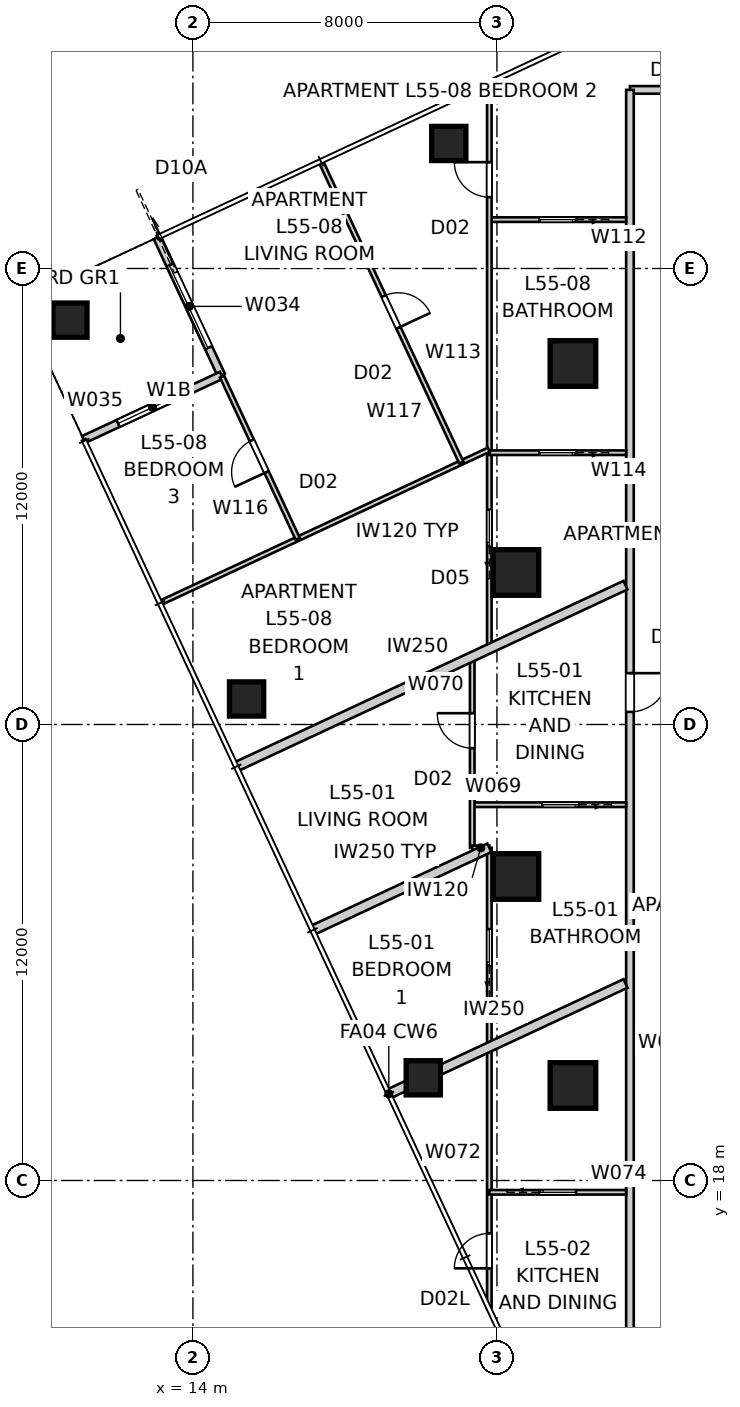
"""IFC4 building model, lengths in metres.
Left out: names, types, materials, properties, quantities, classifications, styles, units other than length and angle.
Written with IfcOpenShell. Run it as: python <this file> out.ifc"""

import sys

from ifc_helpers import new_model, si_unit, direction, frame, frame_2d, origin, origin_2d, place, context, subcontext, project, spatial, rectangle, extrude, element, fill, save


model = new_model("IFC4")
c1 = context("Model", 3, precision=1e-05, world=origin(), true_north=direction((0.0, 1.0)))
c2 = subcontext(c1, "Body", "Model", "MODEL_VIEW")
j1 = project(units=[si_unit("LENGTHUNIT", "METRE"), si_unit("PLANEANGLEUNIT", "RADIAN")], contexts=[c1])
p1 = place(None, origin())
s1 = spatial("IfcSite", under=j1, at=p1, CompositionType="ELEMENT")
p2 = place(p1, origin())
s2 = spatial("IfcBuilding", under=s1, at=p2, CompositionType="ELEMENT")
p3 = place(p2, frame((0.0, 0.0, 199.8)))
s3 = spatial("IfcBuildingStorey", under=s2, at=p3, CompositionType="ELEMENT", Elevation=199.8)
for number, where, z_axis, x_axis in (
    (1, (20.733, 45.29, 0.0), (0.0, 0.0, 1.0), (1.0, 0.0, 0.0)),
    (2, (10.764, 40.641, 0.0), (0.0, 0.0, 1.0), (1.0, 0.0, 0.0)),
    (3, (15.412, 30.672, 0.0), (0.0, 0.0, 1.0), (1.0, 0.0, 0.0)),
    (4, (20.061, 20.702, 0.0), (0.0, 0.0, 1.0), (1.0, 0.0, 0.0)),
):
    element("IfcColumn", number, at=place(p3, frame(where, z_axis=z_axis, x_axis=x_axis)), inside=s3, PredefinedType="COLUMN", context=c2, shape_type="SweptSolid", body=[
        extrude(rectangle(XDim=0.9, YDim=0.9, at=origin_2d()), origin(), (0.0, 0.0, 1.0), 3.2),
    ])
for number, where, z_axis, x_axis in (
    (5, (24.0, 39.5, 0.0), (0.0, 0.0, 1.0), (1.0, 0.0, 0.0)),
    (6, (22.5, 34.0, 0.0), (0.0, 0.0, 1.0), (1.0, 0.0, 0.0)),
    (7, (22.5, 26.0, 0.0), (0.0, 0.0, 1.0), (1.0, 0.0, 0.0)),
    (8, (24.0, 20.5, 0.0), (0.0, 0.0, 1.0), (1.0, 0.0, 0.0)),
):
    element("IfcColumn", number, at=place(p3, frame(where, z_axis=z_axis, x_axis=x_axis)), inside=s3, PredefinedType="COLUMN", context=c2, shape_type="SweptSolid", body=[
        extrude(rectangle(XDim=1.2, YDim=1.2, at=origin_2d()), origin(), (0.0, 0.0, 1.0), 3.4),
    ])
p4 = place(p3, frame((13.06, 42.815, 0.0), z_axis=(0.0, 0.0, 1.0), x_axis=(0.422658246362, -0.906289140828, 0.0)))
e9 = element("IfcWall", 9, at=p4, inside=s3, PredefinedType="SOLIDWALL", context=c2, shape_type="SweptSolid", body=[
    extrude(rectangle(XDim=4.0, YDim=0.2, at=frame_2d((2.0, 0.0))), origin(), (0.0, 0.0, 1.0), 3.2),
])
p5 = place(p4, frame((0.8, 0.0, 0.0)))
e10 = element("IfcOpeningElement", 10, at=p5, cuts=e9, PredefinedType="OPENING", context=c2, shape_type="SweptSolid", body=[
    extrude(rectangle(XDim=2.4, YDim=2.1, at=frame_2d((1.2, 1.05))), frame((0.0, 0.11, 0.0), z_axis=(0.0, -1.0, 0.0), x_axis=(1.0, 0.0, 0.0)), (0.0, 0.0, 1.0), 0.22),
])
p6 = place(p3, frame((14.75, 39.19, 0.0), z_axis=(0.0, 0.0, 1.0), x_axis=(-0.906289140828, -0.422658246362, 0.0)))
e11 = element("IfcWall", 11, at=p6, inside=s3, PredefinedType="SOLIDWALL", context=c2, shape_type="SweptSolid", body=[
    extrude(rectangle(XDim=4.0, YDim=0.2, at=frame_2d((2.0, 0.0))), origin(), (0.0, 0.0, 1.0), 3.2),
])
p7 = place(p6, frame((1.0, 0.0, 0.4)))
e12 = element("IfcOpeningElement", 12, at=p7, cuts=e11, PredefinedType="OPENING", context=c2, shape_type="SweptSolid", body=[
    extrude(rectangle(XDim=2.0, YDim=1.8, at=frame_2d((1.0, 0.9))), frame((0.0, 0.11, 0.0), z_axis=(0.0, -1.0, 0.0), x_axis=(1.0, 0.0, 0.0)), (0.0, 0.0, 1.0), 0.22),
])
p8 = place(p3, frame((32.13, 46.7, 0.0), z_axis=(0.0, 0.0, 1.0), x_axis=(-1.0, 0.0, 0.0)))
e13 = element("IfcWall", 13, at=p8, inside=s3, PredefinedType="PARTITIONING", context=c2, shape_type="SweptSolid", body=[
    extrude(rectangle(XDim=6.63, YDim=0.2, at=frame_2d((3.315, 0.0))), origin(), (0.0, 0.0, 1.0), 3.2),
])
p9 = place(p8, frame((2.552, 0.0, 0.0)))
e14 = element("IfcOpeningElement", 14, at=p9, cuts=e13, PredefinedType="OPENING", context=c2, shape_type="SweptSolid", body=[
    extrude(rectangle(XDim=1.02, YDim=2.34, at=frame_2d((0.51, 1.17))), frame((0.0, 0.11, 0.0), z_axis=(0.0, -1.0, 0.0), x_axis=(1.0, 0.0, 0.0)), (0.0, 0.0, 1.0), 0.22),
])
p10 = place(p3, frame((25.5, 46.7, 0.0), z_axis=(0.0, 0.0, 1.0), x_axis=(0.0, -1.0, 0.0)))
e15 = element("IfcWall", 15, at=p10, inside=s3, PredefinedType="PARTITIONING", context=c2, shape_type="SweptSolid", body=[
    extrude(rectangle(XDim=33.8, YDim=0.2, at=frame_2d((16.9, 0.0))), origin(), (0.0, 0.0, 1.0), 3.2),
])
p11 = place(p10, frame((15.349, 0.0, 0.0)))
e16 = element("IfcOpeningElement", 16, at=p11, cuts=e15, PredefinedType="OPENING", context=c2, shape_type="SweptSolid", body=[
    extrude(rectangle(XDim=1.02, YDim=2.34, at=frame_2d((0.51, 1.17))), frame((0.0, 0.11, 0.0), z_axis=(0.0, -1.0, 0.0), x_axis=(1.0, 0.0, 0.0)), (0.0, 0.0, 1.0), 0.22),
])
p12 = place(p3, frame((19.155, 20.28, 0.0), z_axis=(0.0, 0.0, 1.0), x_axis=(0.90631378723, 0.422605394046, 0.0)))
e17 = element("IfcWall", 17, at=p12, inside=s3, PredefinedType="PARTITIONING", context=c2, shape_type="SweptSolid", body=[
    extrude(rectangle(XDim=6.872, YDim=0.25, at=frame_2d((3.436, 0.0))), origin(), (0.0, 0.0, 1.0), 3.2),
])
p13 = place(p3, frame((15.14, 28.89, 0.0), z_axis=(0.0, 0.0, 1.0), x_axis=(0.906306714884, 0.422620560972, 0.0)))
e18 = element("IfcWall", 18, at=p13, inside=s3, PredefinedType="PARTITIONING", context=c2, shape_type="SweptSolid", body=[
    extrude(rectangle(XDim=11.302, YDim=0.25, at=frame_2d((5.651, 0.0))), origin(), (0.0, 0.0, 1.0), 3.2),
])
p14 = place(p3, frame((25.4, 27.889, 0.0), z_axis=(0.0, 0.0, 1.0), x_axis=(-1.0, 0.0, 0.0)))
e19 = element("IfcWall", 19, at=p14, inside=s3, PredefinedType="PARTITIONING", context=c2, shape_type="SweptSolid", body=[
    extrude(rectangle(XDim=4.05, YDim=0.12, at=frame_2d((2.025, 0.0))), origin(), (0.0, 0.0, 1.0), 3.2),
])
p15 = place(p14, frame((1.245, 0.0, 0.0)))
e20 = element("IfcOpeningElement", 20, at=p15, cuts=e19, PredefinedType="OPENING", context=c2, shape_type="SweptSolid", body=[
    extrude(rectangle(XDim=0.96, YDim=2.1, at=frame_2d((0.48, 1.05))), frame((0.0, 0.07, 0.0), z_axis=(0.0, -1.0, 0.0), x_axis=(1.0, 0.0, 0.0)), (0.0, 0.0, 1.0), 0.14),
])
p16 = place(p3, frame((21.35, 26.754, 0.0), z_axis=(0.0, 0.0, 1.0), x_axis=(0.0, 1.0, 0.0)))
e21 = element("IfcWall", 21, at=p16, inside=s3, PredefinedType="PARTITIONING", context=c2, shape_type="SweptSolid", body=[
    extrude(rectangle(XDim=5.031, YDim=0.12, at=frame_2d((2.516, 0.0))), origin(), (0.0, 0.0, 1.0), 3.2),
])
p17 = place(p16, frame((2.623, 0.0, 0.0)))
e22 = element("IfcOpeningElement", 22, at=p17, cuts=e21, PredefinedType="OPENING", context=c2, shape_type="SweptSolid", body=[
    extrude(rectangle(XDim=0.92, YDim=2.34, at=frame_2d((0.46, 1.17))), frame((0.0, 0.07, 0.0), z_axis=(0.0, -1.0, 0.0), x_axis=(1.0, 0.0, 0.0)), (0.0, 0.0, 1.0), 0.14),
])
p18 = place(p3, frame((21.8, 26.754, 0.0), z_axis=(0.0, 0.0, 1.0), x_axis=(-1.0, 0.0, 0.0)))
e23 = element("IfcWall", 23, at=p18, inside=s3, PredefinedType="PARTITIONING", context=c2, shape_type="SweptSolid", body=[
    extrude(rectangle(XDim=0.45, YDim=0.12, at=frame_2d((0.225, 0.0))), origin(), (0.0, 0.0, 1.0), 3.2),
])
p19 = place(p3, frame((21.8, 14.647, 0.0), z_axis=(0.0, 0.0, 1.0), x_axis=(0.0, 1.0, 0.0)))
e24 = element("IfcWall", 24, at=p19, inside=s3, PredefinedType="PARTITIONING", context=c2, shape_type="SweptSolid", body=[
    extrude(rectangle(XDim=12.107, YDim=0.12, at=frame_2d((6.053, 0.0))), origin(), (0.0, 0.0, 1.0), 3.2),
])
p20 = place(p19, frame((1.041, 0.0, 0.0)))
e25 = element("IfcOpeningElement", 25, at=p20, cuts=e24, PredefinedType="OPENING", context=c2, shape_type="SweptSolid", body=[
    extrude(rectangle(XDim=0.92, YDim=2.1, at=frame_2d((0.46, 1.05))), frame((0.0, 0.07, 0.0), z_axis=(0.0, -1.0, 0.0), x_axis=(1.0, 0.0, 0.0)), (0.0, 0.0, 1.0), 0.14),
])
p21 = place(p19, frame((9.006, 0.0, 0.0)))
e26 = element("IfcOpeningElement", 26, at=p21, cuts=e24, PredefinedType="OPENING", context=c2, shape_type="SweptSolid", body=[
    extrude(rectangle(XDim=0.96, YDim=2.1, at=frame_2d((0.48, 1.05))), frame((0.0, 0.07, 0.0), z_axis=(0.0, -1.0, 0.0), x_axis=(1.0, 0.0, 0.0)), (0.0, 0.0, 1.0), 0.14),
])
p22 = place(p3, frame((21.8, 26.754, 0.0), z_axis=(0.0, 0.0, 1.0), x_axis=(-0.906306780958, -0.422620419278, 0.0)))
e27 = element("IfcWall", 27, at=p22, inside=s3, PredefinedType="PARTITIONING", context=c2, shape_type="SweptSolid", body=[
    extrude(rectangle(XDim=5.094, YDim=0.25, at=frame_2d((2.547, 0.0))), origin(), (0.0, 0.0, 1.0), 3.2),
])
p23 = place(p3, frame((21.8, 17.69, 0.0), z_axis=(0.0, 0.0, 1.0), x_axis=(1.0, 0.0, 0.0)))
e28 = element("IfcWall", 28, at=p23, inside=s3, PredefinedType="PARTITIONING", context=c2, shape_type="SweptSolid", body=[
    extrude(rectangle(XDim=3.6, YDim=0.12, at=frame_2d((1.8, 0.0))), origin(), (0.0, 0.0, 1.0), 3.2),
])
p24 = place(p23, frame((1.32, 0.0, 0.0)))
e29 = element("IfcOpeningElement", 29, at=p24, cuts=e28, PredefinedType="OPENING", context=c2, shape_type="SweptSolid", body=[
    extrude(rectangle(XDim=0.96, YDim=2.1, at=frame_2d((0.48, 1.05))), frame((0.0, 0.07, 0.0), z_axis=(0.0, -1.0, 0.0), x_axis=(1.0, 0.0, 0.0)), (0.0, 0.0, 1.0), 0.14),
])
p25 = place(p3, frame((25.4, 43.286, 0.0), z_axis=(0.0, 0.0, 1.0), x_axis=(-1.0, 0.0, 0.0)))
e30 = element("IfcWall", 30, at=p25, inside=s3, PredefinedType="PARTITIONING", context=c2, shape_type="SweptSolid", body=[
    extrude(rectangle(XDim=3.6, YDim=0.12, at=frame_2d((1.8, 0.0))), origin(), (0.0, 0.0, 1.0), 3.2),
])
p26 = place(p25, frame((1.32, 0.0, 0.0)))
e31 = element("IfcOpeningElement", 31, at=p26, cuts=e30, PredefinedType="OPENING", context=c2, shape_type="SweptSolid", body=[
    extrude(rectangle(XDim=0.96, YDim=2.1, at=frame_2d((0.48, 1.05))), frame((0.0, 0.07, 0.0), z_axis=(0.0, -1.0, 0.0), x_axis=(1.0, 0.0, 0.0)), (0.0, 0.0, 1.0), 0.14),
])
p27 = place(p3, frame((21.8, 31.995, 0.0), z_axis=(0.0, 0.0, 1.0), x_axis=(0.0, 1.0, 0.0)))
e32 = element("IfcWall", 32, at=p27, inside=s3, PredefinedType="PARTITIONING", context=c2, shape_type="SweptSolid", body=[
    extrude(rectangle(XDim=14.851, YDim=0.12, at=frame_2d((7.426, 0.0))), origin(), (0.0, 0.0, 1.0), 3.2),
])
p28 = place(p27, frame((11.883, 0.0, 0.0)))
e33 = element("IfcOpeningElement", 33, at=p28, cuts=e32, PredefinedType="OPENING", context=c2, shape_type="SweptSolid", body=[
    extrude(rectangle(XDim=0.92, YDim=2.34, at=frame_2d((0.46, 1.17))), frame((0.0, 0.07, 0.0), z_axis=(0.0, -1.0, 0.0), x_axis=(1.0, 0.0, 0.0)), (0.0, 0.0, 1.0), 0.14),
])
p29 = place(p27, frame((2.698, 0.0, 0.0)))
e34 = element("IfcOpeningElement", 34, at=p29, cuts=e32, PredefinedType="OPENING", context=c2, shape_type="SweptSolid", body=[
    extrude(rectangle(XDim=0.96, YDim=2.1, at=frame_2d((0.48, 1.05))), frame((0.0, 0.07, 0.0), z_axis=(0.0, -1.0, 0.0), x_axis=(1.0, 0.0, 0.0)), (0.0, 0.0, 1.0), 0.14),
])
p30 = place(p3, frame((25.4, 37.152, 0.0), z_axis=(0.0, 0.0, 1.0), x_axis=(-1.0, 0.0, 0.0)))
e35 = element("IfcWall", 35, at=p30, inside=s3, PredefinedType="PARTITIONING", context=c2, shape_type="SweptSolid", body=[
    extrude(rectangle(XDim=3.6, YDim=0.12, at=frame_2d((1.8, 0.0))), origin(), (0.0, 0.0, 1.0), 3.2),
])
p31 = place(p30, frame((1.32, 0.0, 0.0)))
e36 = element("IfcOpeningElement", 36, at=p31, cuts=e35, PredefinedType="OPENING", context=c2, shape_type="SweptSolid", body=[
    extrude(rectangle(XDim=0.96, YDim=2.1, at=frame_2d((0.48, 1.05))), frame((0.0, 0.07, 0.0), z_axis=(0.0, -1.0, 0.0), x_axis=(1.0, 0.0, 0.0)), (0.0, 0.0, 1.0), 0.14),
])
p32 = place(p3, frame((21.785, 37.229, 0.0), z_axis=(0.0, 0.0, 1.0), x_axis=(-0.906297260976, -0.422640834216, 0.0)))
e37 = element("IfcWall", 37, at=p32, inside=s3, PredefinedType="PARTITIONING", context=c2, shape_type="SweptSolid", body=[
    extrude(rectangle(XDim=9.507, YDim=0.12, at=frame_2d((4.753, 0.0))), origin(), (0.0, 0.0, 1.0), 3.2),
])
p33 = place(p3, frame((16.758, 34.885, 0.0), z_axis=(0.0, 0.0, 1.0), x_axis=(-0.422601682441, 0.906315517906, 0.0)))
e38 = element("IfcWall", 38, at=p33, inside=s3, PredefinedType="PARTITIONING", context=c2, shape_type="SweptSolid", body=[
    extrude(rectangle(XDim=4.71, YDim=0.12, at=frame_2d((2.355, 0.0))), origin(), (0.0, 0.0, 1.0), 3.2),
])
p34 = place(p33, frame((1.94, 0.0, 0.0)))
e39 = element("IfcOpeningElement", 39, at=p34, cuts=e38, PredefinedType="OPENING", context=c2, shape_type="SweptSolid", body=[
    extrude(rectangle(XDim=0.92, YDim=2.34, at=frame_2d((0.46, 1.17))), frame((0.0, 0.07, 0.0), z_axis=(0.0, -1.0, 0.0), x_axis=(1.0, 0.0, 0.0)), (0.0, 0.0, 1.0), 0.14),
])
p35 = place(p3, frame((17.382, 44.787, 0.0), z_axis=(0.0, 0.0, 1.0), x_axis=(0.422604635972, -0.906314140712, 0.0)))
e40 = element("IfcWall", 40, at=p35, inside=s3, PredefinedType="PARTITIONING", context=c2, shape_type="SweptSolid", body=[
    extrude(rectangle(XDim=8.71, YDim=0.12, at=frame_2d((4.355, 0.0))), origin(), (0.0, 0.0, 1.0), 3.2),
])
p36 = place(p35, frame((3.875, 0.0, 0.0)))
e41 = element("IfcOpeningElement", 41, at=p36, cuts=e40, PredefinedType="OPENING", context=c2, shape_type="SweptSolid", body=[
    extrude(rectangle(XDim=0.92, YDim=2.34, at=frame_2d((0.46, 1.17))), frame((0.0, 0.07, 0.0), z_axis=(0.0, -1.0, 0.0), x_axis=(1.0, 0.0, 0.0)), (0.0, 0.0, 1.0), 0.14),
])
p37 = place(p5, origin())
e42 = element("IfcDoor", 42, at=p37, inside=s3, OperationType="SLIDING_TO_LEFT", PredefinedType="DOOR", context=c2, shape_type="SweptSolid", body=[
    extrude(rectangle(XDim=2.4, YDim=2.1, at=frame_2d((1.2, 1.05))), frame((0.0, 0.025, 0.0), z_axis=(0.0, -1.0, 0.0), x_axis=(1.0, 0.0, 0.0)), (0.0, 0.0, 1.0), 0.05),
])
fill(e10, e42)
p38 = place(p7, origin())
e43 = element("IfcWindow", 43, at=p38, inside=s3, PartitioningType="SINGLE_PANEL", PredefinedType="WINDOW", context=c2, shape_type="SweptSolid", body=[
    extrude(rectangle(XDim=2.0, YDim=1.8, at=frame_2d((1.0, 0.9))), frame((0.0, 0.03, 0.0), z_axis=(0.0, -1.0, 0.0), x_axis=(1.0, 0.0, 0.0)), (0.0, 0.0, 1.0), 0.06),
])
fill(e12, e43)
p39 = place(p11, origin())
e44 = element("IfcDoor", 44, at=p39, inside=s3, OperationType="SINGLE_SWING_LEFT", PredefinedType="DOOR", context=c2, shape_type="SweptSolid", body=[
    extrude(rectangle(XDim=1.02, YDim=2.34, at=frame_2d((0.51, 1.17))), frame((0.0, 0.025, 0.0), z_axis=(0.0, -1.0, 0.0), x_axis=(1.0, 0.0, 0.0)), (0.0, 0.0, 1.0), 0.05),
])
fill(e16, e44)
p40 = place(p28, origin())
e45 = element("IfcDoor", 45, at=p40, inside=s3, OperationType="SINGLE_SWING_RIGHT", PredefinedType="DOOR", context=c2, shape_type="SweptSolid", body=[
    extrude(rectangle(XDim=0.92, YDim=2.34, at=frame_2d((0.46, 1.17))), frame((0.0, 0.025, 0.0), z_axis=(0.0, -1.0, 0.0), x_axis=(1.0, 0.0, 0.0)), (0.0, 0.0, 1.0), 0.05),
])
fill(e33, e45)
p41 = place(p26, origin())
e46 = element("IfcDoor", 46, at=p41, inside=s3, OperationType="SLIDING_TO_LEFT", PredefinedType="DOOR", context=c2, shape_type="SweptSolid", body=[
    extrude(rectangle(XDim=0.96, YDim=2.1, at=frame_2d((0.48, 1.05))), frame((0.0, 0.025, 0.0), z_axis=(0.0, -1.0, 0.0), x_axis=(1.0, 0.0, 0.0)), (0.0, 0.0, 1.0), 0.05),
])
fill(e31, e46)
p42 = place(p15, origin())
e47 = element("IfcDoor", 47, at=p42, inside=s3, OperationType="SLIDING_TO_LEFT", PredefinedType="DOOR", context=c2, shape_type="SweptSolid", body=[
    extrude(rectangle(XDim=0.96, YDim=2.1, at=frame_2d((0.48, 1.05))), frame((0.0, 0.025, 0.0), z_axis=(0.0, -1.0, 0.0), x_axis=(1.0, 0.0, 0.0)), (0.0, 0.0, 1.0), 0.05),
])
fill(e20, e47)
p43 = place(p17, origin())
e48 = element("IfcDoor", 48, at=p43, inside=s3, OperationType="SINGLE_SWING_RIGHT", PredefinedType="DOOR", context=c2, shape_type="SweptSolid", body=[
    extrude(rectangle(XDim=0.92, YDim=2.34, at=frame_2d((0.46, 1.17))), frame((0.0, 0.025, 0.0), z_axis=(0.0, -1.0, 0.0), x_axis=(1.0, 0.0, 0.0)), (0.0, 0.0, 1.0), 0.05),
])
fill(e22, e48)
p44 = place(p24, origin())
e49 = element("IfcDoor", 49, at=p44, inside=s3, OperationType="SLIDING_TO_LEFT", PredefinedType="DOOR", context=c2, shape_type="SweptSolid", body=[
    extrude(rectangle(XDim=0.96, YDim=2.1, at=frame_2d((0.48, 1.05))), frame((0.0, 0.025, 0.0), z_axis=(0.0, -1.0, 0.0), x_axis=(1.0, 0.0, 0.0)), (0.0, 0.0, 1.0), 0.05),
])
fill(e29, e49)
p45 = place(p20, origin())
e50 = element("IfcDoor", 50, at=p45, inside=s3, OperationType="SINGLE_SWING_LEFT", PredefinedType="DOOR", context=c2, shape_type="SweptSolid", body=[
    extrude(rectangle(XDim=0.92, YDim=2.1, at=frame_2d((0.46, 1.05))), frame((0.0, 0.025, 0.0), z_axis=(0.0, -1.0, 0.0), x_axis=(1.0, 0.0, 0.0)), (0.0, 0.0, 1.0), 0.05),
])
fill(e25, e50)
p46 = place(p31, origin())
e51 = element("IfcDoor", 51, at=p46, inside=s3, OperationType="SLIDING_TO_LEFT", PredefinedType="DOOR", context=c2, shape_type="SweptSolid", body=[
    extrude(rectangle(XDim=0.96, YDim=2.1, at=frame_2d((0.48, 1.05))), frame((0.0, 0.025, 0.0), z_axis=(0.0, -1.0, 0.0), x_axis=(1.0, 0.0, 0.0)), (0.0, 0.0, 1.0), 0.05),
])
fill(e36, e51)
p47 = place(p21, origin())
e52 = element("IfcDoor", 52, at=p47, inside=s3, OperationType="SLIDING_TO_LEFT", PredefinedType="DOOR", context=c2, shape_type="SweptSolid", body=[
    extrude(rectangle(XDim=0.96, YDim=2.1, at=frame_2d((0.48, 1.05))), frame((0.0, 0.025, 0.0), z_axis=(0.0, -1.0, 0.0), x_axis=(1.0, 0.0, 0.0)), (0.0, 0.0, 1.0), 0.05),
])
fill(e26, e52)
p48 = place(p29, origin())
e53 = element("IfcDoor", 53, at=p48, inside=s3, OperationType="SLIDING_TO_LEFT", PredefinedType="DOOR", context=c2, shape_type="SweptSolid", body=[
    extrude(rectangle(XDim=0.96, YDim=2.1, at=frame_2d((0.48, 1.05))), frame((0.0, 0.025, 0.0), z_axis=(0.0, -1.0, 0.0), x_axis=(1.0, 0.0, 0.0)), (0.0, 0.0, 1.0), 0.05),
])
fill(e34, e53)
p49 = place(p36, origin())
e54 = element("IfcDoor", 54, at=p49, inside=s3, OperationType="SINGLE_SWING_RIGHT", PredefinedType="DOOR", context=c2, shape_type="SweptSolid", body=[
    extrude(rectangle(XDim=0.92, YDim=2.34, at=frame_2d((0.46, 1.17))), frame((0.0, 0.025, 0.0), z_axis=(0.0, -1.0, 0.0), x_axis=(1.0, 0.0, 0.0)), (0.0, 0.0, 1.0), 0.05),
])
fill(e41, e54)
p50 = place(p34, origin())
e55 = element("IfcDoor", 55, at=p50, inside=s3, OperationType="SINGLE_SWING_LEFT", PredefinedType="DOOR", context=c2, shape_type="SweptSolid", body=[
    extrude(rectangle(XDim=0.92, YDim=2.34, at=frame_2d((0.46, 1.17))), frame((0.0, 0.025, 0.0), z_axis=(0.0, -1.0, 0.0), x_axis=(1.0, 0.0, 0.0)), (0.0, 0.0, 1.0), 0.05),
])
fill(e39, e55)
save(model, sys.argv[1])
